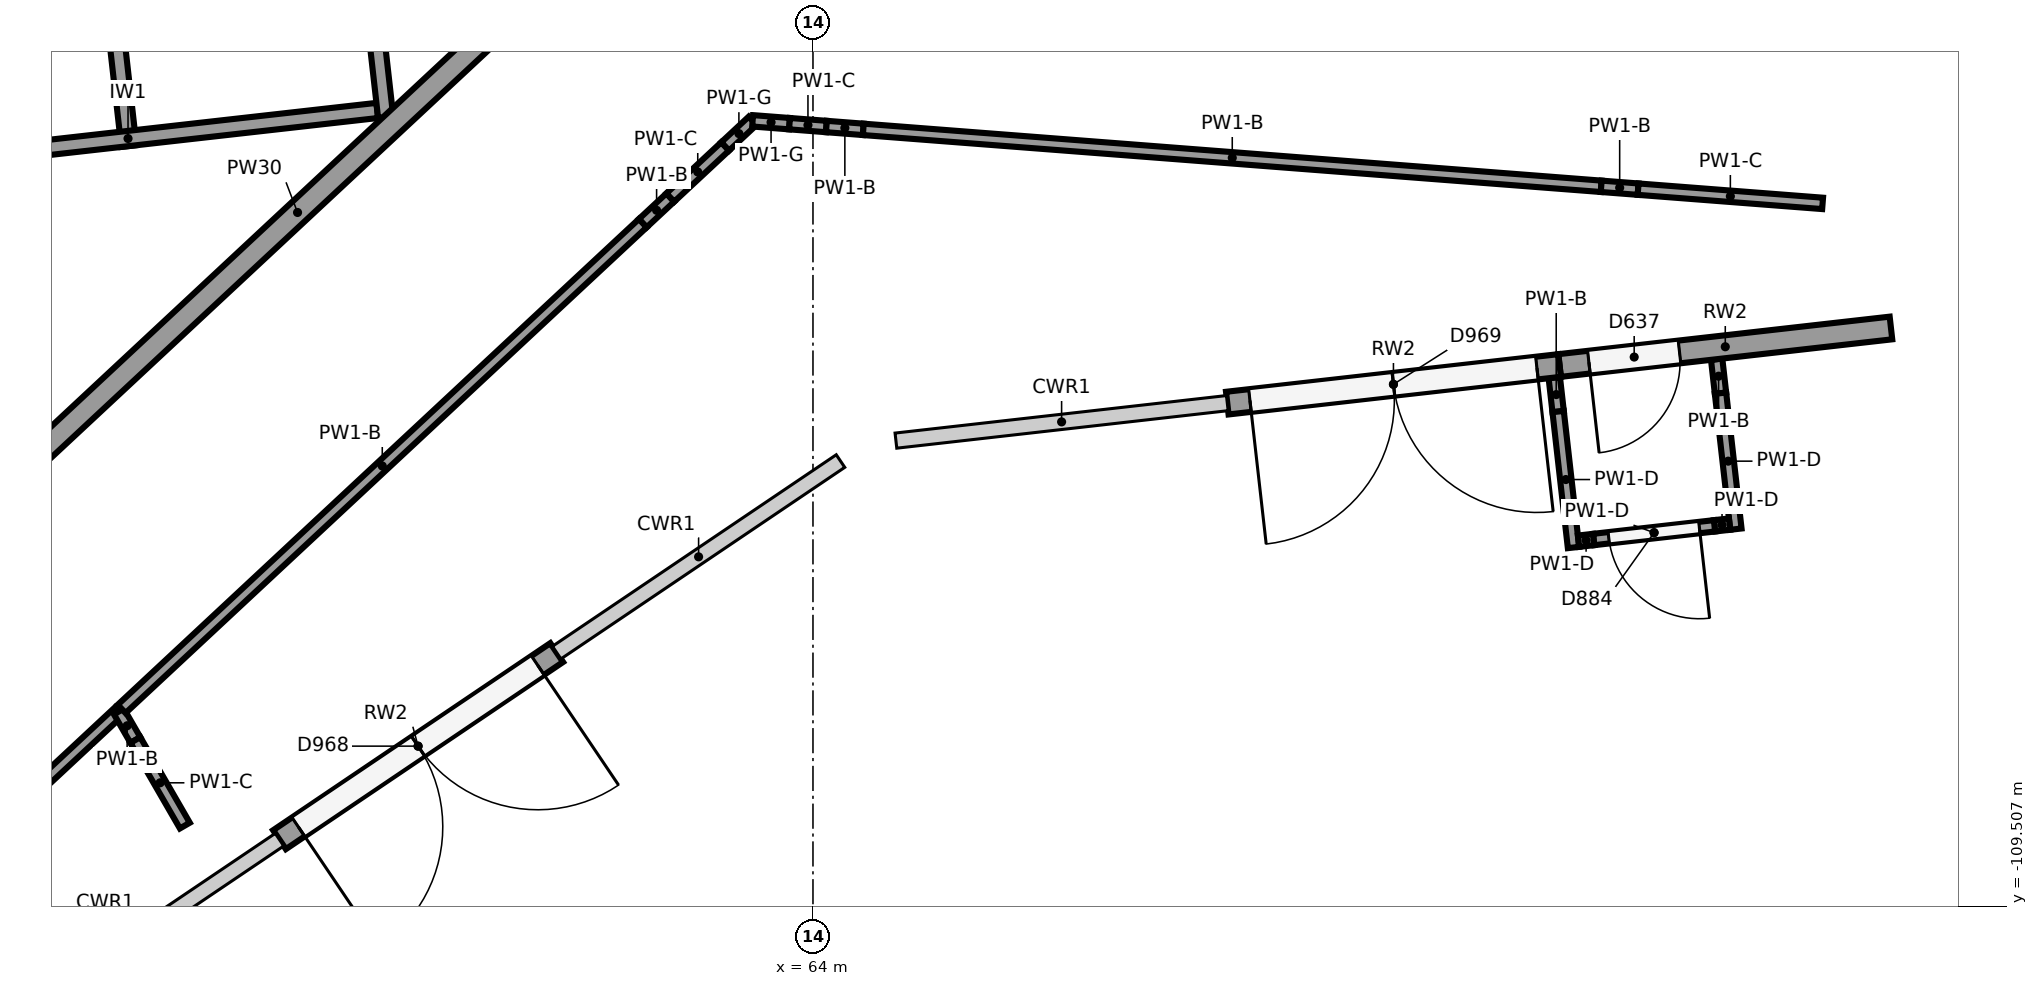
"""IFC4 building model, lengths in metres.
Left out: names, types, materials, properties, quantities, classifications, styles, units other than length and angle.
Written with IfcOpenShell. Run it as: python <this file> out.ifc"""

import sys

from ifc_helpers import new_model, si_unit, direction, frame, frame_2d, origin, origin_2d, place, context, subcontext, project, spatial, rectangle, circle, extrude, element, fill, save


model = new_model("IFC4")
c1 = context("Model", 3, precision=1e-05, world=origin(), true_north=direction((0.0, 1.0)))
c2 = subcontext(c1, "Body", "Model", "MODEL_VIEW")
j1 = project(units=[si_unit("LENGTHUNIT", "METRE"), si_unit("PLANEANGLEUNIT", "RADIAN")], contexts=[c1])
p1 = place(None, origin())
s1 = spatial("IfcSite", under=j1, at=p1, CompositionType="ELEMENT")
p2 = place(p1, origin())
s2 = spatial("IfcBuilding", under=s1, at=p2, CompositionType="ELEMENT")
p3 = place(p2, origin())
s3 = spatial("IfcBuildingStorey", under=s2, at=p3, CompositionType="ELEMENT", Elevation=0.0)
for number, where, z_axis, x_axis in (
    (1, (63.373, -99.648, -0.3), (0.0, 0.0, 1.0), (1.0, 0.0, 0.0)),
    (2, (64.694, -103.424, -0.3), (0.0, 0.0, 1.0), (1.0, 0.0, 0.0)),
    (3, (66.477, -108.521, -0.3), (0.0, 0.0, 1.0), (1.0, 0.0, 0.0)),
    (4, (77.187, -99.634, -0.3), (0.0, 0.0, 1.0), (1.0, 0.0, 0.0)),
    (5, (78.581, -101.852, -0.3), (0.0, 0.0, 1.0), (1.0, 0.0, 0.0)),
):
    element("IfcColumn", number, at=place(p3, frame(where, z_axis=z_axis, x_axis=x_axis)), inside=s3, PredefinedType="COLUMN", context=c2, shape_type="SweptSolid", body=[
        extrude(circle(Radius=0.4, at=origin_2d()), origin(), (0.0, 0.0, 1.0), 6.8),
    ])
p4 = place(p3, frame((60.628, -106.167, 0.0), z_axis=(0.0, 0.0, 1.0), x_axis=(-0.828921355382, -0.559365163907, 0.0)))
e6 = element("IfcWall", 6, at=p4, inside=s3, PredefinedType="SOLIDWALL", context=c2, shape_type="SweptSolid", body=[
    extrude(rectangle(XDim=4.4, YDim=0.3, at=frame_2d((2.2, 0.0))), origin(), (0.0, 0.0, 1.0), 4.85),
])
p5 = place(p4, frame((0.3, 0.0, 0.0)))
e7 = element("IfcOpeningElement", 7, at=p5, cuts=e6, PredefinedType="OPENING", context=c2, shape_type="SweptSolid", body=[
    extrude(rectangle(XDim=3.8, YDim=2.8, at=frame_2d((1.9, 1.4))), frame((0.0, 0.16, 0.0), z_axis=(0.0, -1.0, 0.0), x_axis=(1.0, 0.0, 0.0)), (0.0, 0.0, 1.0), 0.32),
])
p6 = place(p3, frame((73.823, -102.39, 0.0), z_axis=(0.0, 0.0, 1.0), x_axis=(-0.993654957488, -0.112471442865, 0.0)))
e8 = element("IfcWall", 8, at=p6, inside=s3, PredefinedType="SOLIDWALL", context=c2, shape_type="SweptSolid", body=[
    extrude(rectangle(XDim=4.4, YDim=0.3, at=frame_2d((2.2, 0.0))), origin(), (0.0, 0.0, 1.0), 4.85),
])
p7 = place(p6, frame((0.3, 0.0, 0.0)))
e9 = element("IfcOpeningElement", 9, at=p7, cuts=e8, PredefinedType="OPENING", context=c2, shape_type="SweptSolid", body=[
    extrude(rectangle(XDim=3.8, YDim=2.8, at=frame_2d((1.9, 1.4))), frame((0.0, 0.16, 0.0), z_axis=(0.0, -1.0, 0.0), x_axis=(1.0, 0.0, 0.0)), (0.0, 0.0, 1.0), 0.32),
])
p8 = place(p3, frame((78.183, -101.897, 0.0), z_axis=(0.0, 0.0, 1.0), x_axis=(-0.993657074804, -0.112452735367, 0.0)))
e10 = element("IfcWall", 10, at=p8, inside=s3, PredefinedType="SOLIDWALL", context=c2, shape_type="SweptSolid", body=[
    extrude(rectangle(XDim=4.388, YDim=0.3, at=frame_2d((2.194, 0.0))), origin(), (0.0, 0.0, 1.0), 4.85),
])
p9 = place(p8, frame((2.8, 0.0, 0.0)))
e11 = element("IfcOpeningElement", 11, at=p9, cuts=e10, PredefinedType="OPENING", context=c2, shape_type="SweptSolid", body=[
    extrude(rectangle(XDim=1.2, YDim=2.1, at=frame_2d((0.6, 1.05))), frame((0.0, 0.16, 0.0), z_axis=(0.0, -1.0, 0.0), x_axis=(1.0, 0.0, 0.0)), (0.0, 0.0, 1.0), 0.32),
])
p10 = place(p3, frame((61.723, -96.179, 0.0), z_axis=(0.0, 0.0, 1.0), x_axis=(-0.731540985517, -0.681797467368, 0.0)))
e12 = element("IfcWall", 12, at=p10, inside=s3, PredefinedType="SOLIDWALL", context=c2, shape_type="SweptSolid", body=[
    extrude(rectangle(XDim=12.314, YDim=0.3, at=frame_2d((6.157, 0.0))), origin(), (0.0, 0.0, 1.0), 4.85),
])
p11 = place(p3, frame((58.378, -99.123, 0.0), z_axis=(0.0, 0.0, 1.0), x_axis=(-0.111982724367, 0.993710153638, 0.0)))
e13 = element("IfcWall", 13, at=p11, inside=s3, PredefinedType="SHEAR", context=c2, shape_type="SweptSolid", body=[
    extrude(rectangle(XDim=7.6, YDim=0.2, at=frame_2d((3.8, 0.0))), origin(), (0.0, 0.0, 1.0), 6.15),
])
p12 = place(p3, frame((51.709, -99.774, 0.0), z_axis=(0.0, 0.0, 1.0), x_axis=(0.993715690617, 0.111933579504, 0.0)))
e14 = element("IfcWall", 14, at=p12, inside=s3, PredefinedType="SHEAR", context=c2, shape_type="SweptSolid", body=[
    extrude(rectangle(XDim=6.6, YDim=0.2, at=frame_2d((3.3, 0.0))), origin(), (0.0, 0.0, 1.0), 6.15),
])
p13 = place(p3, frame((54.999, -99.504, 0.0), z_axis=(0.0, 0.0, 1.0), x_axis=(-0.111982724367, 0.993710153638, 0.0)))
e15 = element("IfcWall", 15, at=p13, inside=s3, PredefinedType="SHEAR", context=c2, shape_type="SweptSolid", body=[
    extrude(rectangle(XDim=7.6, YDim=0.2, at=frame_2d((3.8, 0.0))), origin(), (0.0, 0.0, 1.0), 6.15),
])
p14 = place(p3, frame((52.867, -108.807, 0.0), z_axis=(0.0, 0.0, 1.0), x_axis=(0.731527016753, 0.681812454976, 0.0)))
e16 = element("IfcWall", 16, at=p14, inside=s3, PredefinedType="PARTITIONING", context=c2, shape_type="SweptSolid", body=[
    extrude(rectangle(XDim=2.735, YDim=0.15, at=frame_2d((1.368, 0.0))), origin(), (0.0, 0.0, 1.0), 4.85),
])
p15 = place(p3, frame((54.868, -106.942, 0.0), z_axis=(0.0, 0.0, 1.0), x_axis=(0.500258826225, -0.865875918815, 0.0)))
e17 = element("IfcWall", 17, at=p15, inside=s3, PredefinedType="PARTITIONING", context=c2, shape_type="SweptSolid", body=[
    extrude(rectangle(XDim=0.433, YDim=0.15, at=frame_2d((0.217, 0.0))), origin(), (0.0, 0.0, 1.0), 4.85),
])
p16 = place(p3, frame((55.085, -107.317, 0.0), z_axis=(0.0, 0.0, 1.0), x_axis=(0.50037765803, -0.865807252998, 0.0)))
e18 = element("IfcWall", 18, at=p16, inside=s3, PredefinedType="PARTITIONING", context=c2, shape_type="SweptSolid", body=[
    extrude(rectangle(XDim=1.301, YDim=0.15, at=frame_2d((0.65, 0.0))), origin(), (0.0, 0.0, 1.0), 6.05),
])
p17 = place(p3, frame((54.904, -106.908, 0.0), z_axis=(0.0, 0.0, 1.0), x_axis=(0.731553048923, 0.681784523594, 0.0)))
e19 = element("IfcWall", 19, at=p17, inside=s3, PredefinedType="PARTITIONING", context=c2, shape_type="SweptSolid", body=[
    extrude(rectangle(XDim=9.375, YDim=0.15, at=frame_2d((4.687, 0.0))), origin(), (0.0, 0.0, 1.0), 4.85),
])
p18 = place(p3, frame((61.762, -100.517, 0.0), z_axis=(0.0, 0.0, 1.0), x_axis=(0.731417207669, 0.681930251805, 0.0)))
e20 = element("IfcWall", 20, at=p18, inside=s3, PredefinedType="PARTITIONING", context=c2, shape_type="SweptSolid", body=[
    extrude(rectangle(XDim=0.493, YDim=0.15, at=frame_2d((0.247, 0.0))), origin(), (0.0, 0.0, 1.0), 4.85),
])
p19 = place(p3, frame((62.123, -100.18, 0.0), z_axis=(0.0, 0.0, 1.0), x_axis=(0.731655638736, 0.681674428379, 0.0)))
e21 = element("IfcWall", 21, at=p19, inside=s3, PredefinedType="PARTITIONING", context=c2, shape_type="SweptSolid", body=[
    extrude(rectangle(XDim=0.987, YDim=0.15, at=frame_2d((0.493, 0.0))), origin(), (0.0, 0.0, 1.0), 6.05),
])
p20 = place(p3, frame((62.845, -99.508, 0.0), z_axis=(0.0, 0.0, 1.0), x_axis=(0.731417207669, 0.681930251805, 0.0)))
e22 = element("IfcWall", 22, at=p20, inside=s3, PredefinedType="PARTITIONING", context=c2, shape_type="SweptSolid", body=[
    extrude(rectangle(XDim=0.493, YDim=0.15, at=frame_2d((0.247, 0.0))), origin(), (0.0, 0.0, 1.0), 5.4),
])
p21 = place(p3, frame((63.206, -99.171, 0.0), z_axis=(0.0, 0.0, 1.0), x_axis=(0.997051534558, -0.076734851503, 0.0)))
e23 = element("IfcWall", 23, at=p21, inside=s3, PredefinedType="PARTITIONING", context=c2, shape_type="SweptSolid", body=[
    extrude(rectangle(XDim=0.487, YDim=0.15, at=frame_2d((0.243, 0.0))), origin(), (0.0, 0.0, 1.0), 5.4),
])
p22 = place(p3, frame((63.691, -99.209, 0.0), z_axis=(0.0, 0.0, 1.0), x_axis=(0.997054485502, -0.076696498885, 0.0)))
e24 = element("IfcWall", 24, at=p22, inside=s3, PredefinedType="PARTITIONING", context=c2, shape_type="SweptSolid", body=[
    extrude(rectangle(XDim=0.487, YDim=0.15, at=frame_2d((0.244, 0.0))), origin(), (0.0, 0.0, 1.0), 6.05),
])
p23 = place(p3, frame((64.177, -99.246, 0.0), z_axis=(0.0, 0.0, 1.0), x_axis=(0.99701303965, -0.07723340448, 0.0)))
e25 = element("IfcWall", 25, at=p23, inside=s3, PredefinedType="PARTITIONING", context=c2, shape_type="SweptSolid", body=[
    extrude(rectangle(XDim=0.487, YDim=0.15, at=frame_2d((0.243, 0.0))), origin(), (0.0, 0.0, 1.0), 4.85),
])
p24 = place(p3, frame((64.662, -99.284, 0.0), z_axis=(0.0, 0.0, 1.0), x_axis=(0.997035430136, -0.076943817519, 0.0)))
e26 = element("IfcWall", 26, at=p24, inside=s3, PredefinedType="PARTITIONING", context=c2, shape_type="SweptSolid", body=[
    extrude(rectangle(XDim=9.738, YDim=0.15, at=frame_2d((4.869, 0.0))), origin(), (0.0, 0.0, 1.0), 4.85),
])
p25 = place(p3, frame((74.371, -100.033, 0.0), z_axis=(0.0, 0.0, 1.0), x_axis=(0.997051534558, -0.076734851503, 0.0)))
e27 = element("IfcWall", 27, at=p25, inside=s3, PredefinedType="PARTITIONING", context=c2, shape_type="SweptSolid", body=[
    extrude(rectangle(XDim=0.487, YDim=0.15, at=frame_2d((0.243, 0.0))), origin(), (0.0, 0.0, 1.0), 4.85),
])
p26 = place(p3, frame((74.856, -100.07, 0.0), z_axis=(0.0, 0.0, 1.0), x_axis=(0.99703735319, -0.076918894578, 0.0)))
e28 = element("IfcWall", 28, at=p26, inside=s3, PredefinedType="PARTITIONING", context=c2, shape_type="SweptSolid", body=[
    extrude(rectangle(XDim=2.435, YDim=0.15, at=frame_2d((1.217, 0.0))), origin(), (0.0, 0.0, 1.0), 6.05),
])
p27 = place(p3, frame((75.89, -102.307, 0.0), z_axis=(0.0, 0.0, 1.0), x_axis=(0.112276818937, -0.993676967595, 0.0)))
e29 = element("IfcWall", 29, at=p27, inside=s3, PredefinedType="PARTITIONING", context=c2, shape_type="SweptSolid", body=[
    extrude(rectangle(XDim=0.45, YDim=0.15, at=frame_2d((0.225, 0.0))), origin(), (0.0, 0.0, 1.0), 4.85),
])
p28 = place(p3, frame((75.94, -102.755, 0.0), z_axis=(0.0, 0.0, 1.0), x_axis=(0.112441006732, -0.99365840207, 0.0)))
e30 = element("IfcWall", 30, at=p28, inside=s3, PredefinedType="PARTITIONING", context=c2, shape_type="SweptSolid", body=[
    extrude(rectangle(XDim=1.8, YDim=0.15, at=frame_2d((0.9, 0.0))), origin(), (0.0, 0.0, 1.0), 6.1),
])
p29 = place(p3, frame((73.753, -102.549, 0.0), z_axis=(0.0, 0.0, 1.0), x_axis=(0.112873160154, -0.993609405006, 0.0)))
e31 = element("IfcWall", 31, at=p29, inside=s3, PredefinedType="PARTITIONING", context=c2, shape_type="SweptSolid", body=[
    extrude(rectangle(XDim=0.45, YDim=0.15, at=frame_2d((0.225, 0.0))), origin(), (0.0, 0.0, 1.0), 4.85),
])
p30 = place(p3, frame((73.804, -102.996, 0.0), z_axis=(0.0, 0.0, 1.0), x_axis=(0.112441006732, -0.99365840207, 0.0)))
e32 = element("IfcWall", 32, at=p30, inside=s3, PredefinedType="PARTITIONING", context=c2, shape_type="SweptSolid", body=[
    extrude(rectangle(XDim=1.8, YDim=0.15, at=frame_2d((0.9, 0.0))), origin(), (0.0, 0.0, 1.0), 6.1),
])
p31 = place(p3, frame((76.06, -104.477, 0.0), z_axis=(0.0, 0.0, 1.0), x_axis=(-0.993673547442, -0.112307083986, 0.0)))
e33 = element("IfcWall", 33, at=p31, inside=s3, PredefinedType="PARTITIONING", context=c2, shape_type="SweptSolid", body=[
    extrude(rectangle(XDim=0.2, YDim=0.15, at=frame_2d((0.1, 0.0))), origin(), (0.0, 0.0, 1.0), 6.1),
])
p32 = place(p3, frame((75.861, -104.5, 0.0), z_axis=(0.0, 0.0, 1.0), x_axis=(-0.993656507662, -0.112457746644, 0.0)))
e34 = element("IfcWall", 34, at=p32, inside=s3, PredefinedType="PARTITIONING", context=c2, shape_type="SweptSolid", body=[
    extrude(rectangle(XDim=1.6, YDim=0.15, at=frame_2d((0.8, 0.0))), origin(), (0.0, 0.0, 1.0), 6.1),
])
p33 = place(p32, frame((0.2, 0.0, 0.0)))
e35 = element("IfcOpeningElement", 35, at=p33, cuts=e34, PredefinedType="OPENING", context=c2, shape_type="SweptSolid", body=[
    extrude(rectangle(XDim=1.2, YDim=2.1, at=frame_2d((0.6, 1.05))), frame((0.0, 0.085, 0.0), z_axis=(0.0, -1.0, 0.0), x_axis=(1.0, 0.0, 0.0)), (0.0, 0.0, 1.0), 0.17),
])
p34 = place(p3, frame((74.271, -104.679, 0.0), z_axis=(0.0, 0.0, 1.0), x_axis=(-0.993673547442, -0.112307083986, 0.0)))
e36 = element("IfcWall", 36, at=p34, inside=s3, PredefinedType="PARTITIONING", context=c2, shape_type="SweptSolid", body=[
    extrude(rectangle(XDim=0.2, YDim=0.15, at=frame_2d((0.1, 0.0))), origin(), (0.0, 0.0, 1.0), 6.1),
])
p35 = place(p5, origin())
e37 = element("IfcDoor", 37, at=p35, inside=s3, OperationType="DOUBLE_DOOR_SINGLE_SWING", PredefinedType="DOOR", context=c2, shape_type="SweptSolid", body=[
    extrude(rectangle(XDim=3.8, YDim=2.8, at=frame_2d((1.9, 1.4))), frame((0.0, 0.025, 0.0), z_axis=(0.0, -1.0, 0.0), x_axis=(1.0, 0.0, 0.0)), (0.0, 0.0, 1.0), 0.05),
])
fill(e7, e37)
p36 = place(p7, origin())
e38 = element("IfcDoor", 38, at=p36, inside=s3, OperationType="DOUBLE_DOOR_SINGLE_SWING", PredefinedType="DOOR", context=c2, shape_type="SweptSolid", body=[
    extrude(rectangle(XDim=3.8, YDim=2.8, at=frame_2d((1.9, 1.4))), frame((0.0, 0.025, 0.0), z_axis=(0.0, -1.0, 0.0), x_axis=(1.0, 0.0, 0.0)), (0.0, 0.0, 1.0), 0.05),
])
fill(e9, e38)
p37 = place(p9, origin())
e39 = element("IfcDoor", 39, at=p37, inside=s3, OperationType="SINGLE_SWING_RIGHT", PredefinedType="DOOR", context=c2, shape_type="SweptSolid", body=[
    extrude(rectangle(XDim=1.2, YDim=2.1, at=frame_2d((0.6, 1.05))), frame((0.0, 0.025, 0.0), z_axis=(0.0, -1.0, 0.0), x_axis=(1.0, 0.0, 0.0)), (0.0, 0.0, 1.0), 0.05),
])
fill(e11, e39)
p38 = place(p33, origin())
e40 = element("IfcDoor", 40, at=p38, inside=s3, OperationType="SINGLE_SWING_LEFT", PredefinedType="DOOR", context=c2, shape_type="SweptSolid", body=[
    extrude(rectangle(XDim=1.2, YDim=2.1, at=frame_2d((0.6, 1.05))), frame((0.0, 0.025, 0.0), z_axis=(0.0, -1.0, 0.0), x_axis=(1.0, 0.0, 0.0)), (0.0, 0.0, 1.0), 0.05),
])
fill(e35, e40)
save(model, sys.argv[1])
